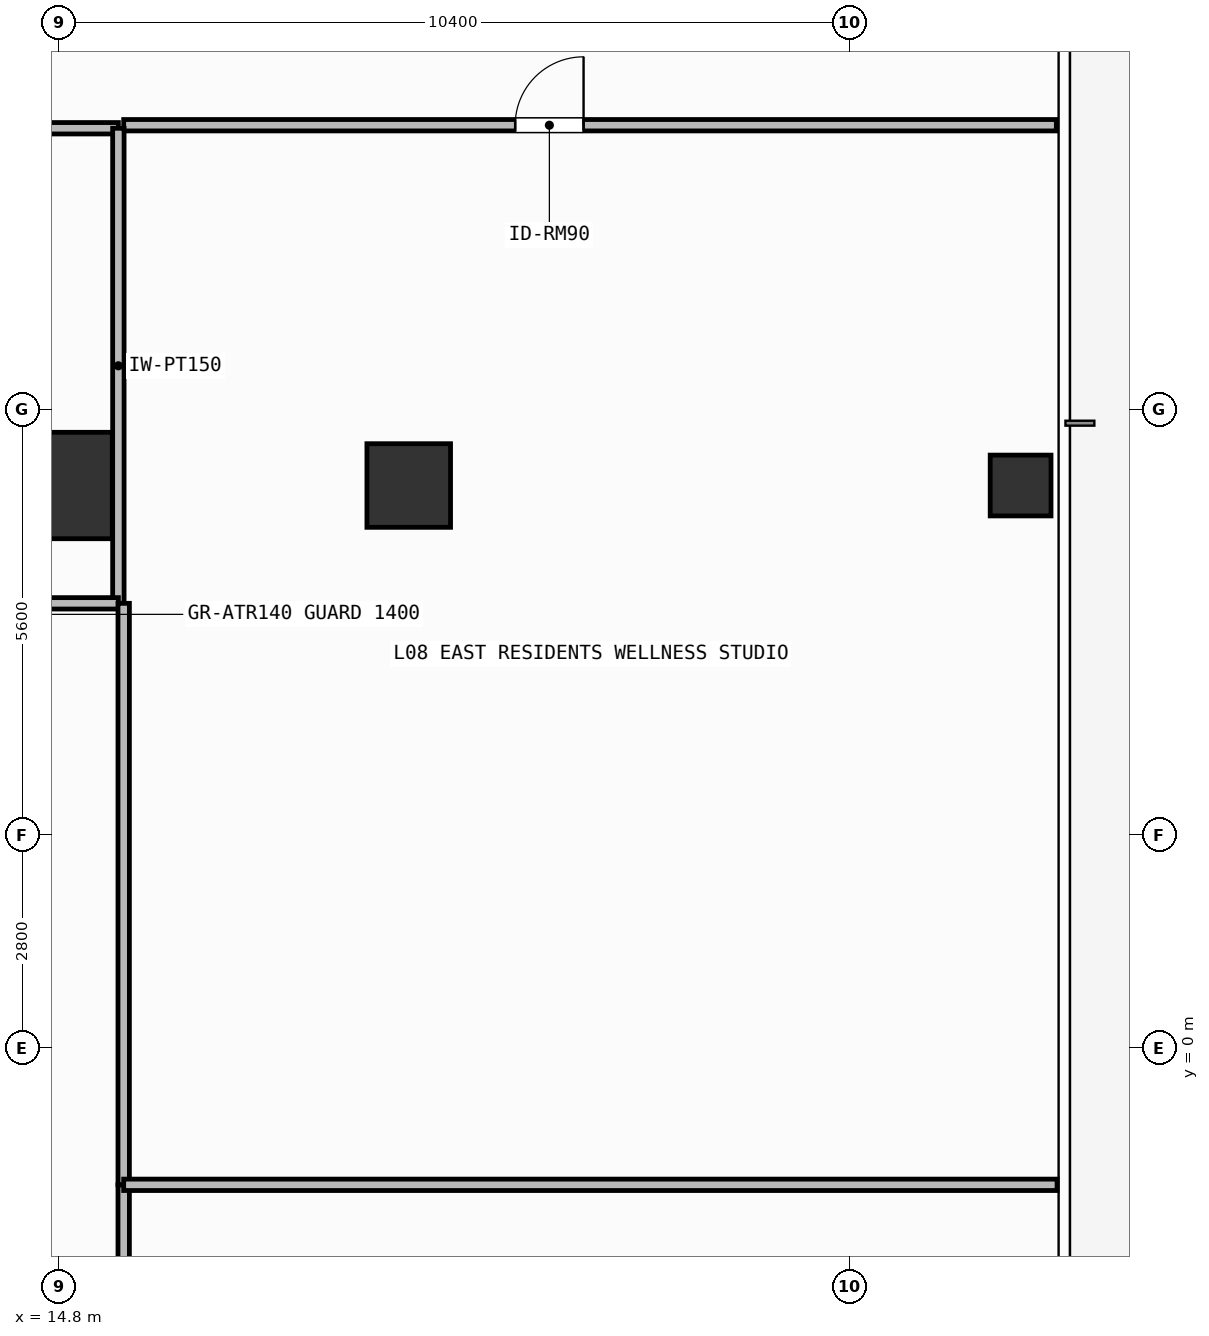
"""IFC4 building model, lengths in metres.
Left out: names, types, materials, properties, quantities, classifications, styles, units other than length and angle.
Written with IfcOpenShell. Run it as: python <this file> out.ifc"""

import sys

from ifc_helpers import new_model, si_unit, direction, frame, frame_2d, origin, origin_2d, place, context, subcontext, project, spatial, rectangle, hollow_rectangle, extrude, element, fill, save


model = new_model("IFC4")
c1 = context("Model", 3, precision=1e-05, world=origin(), true_north=direction((0.0, 1.0)))
c2 = subcontext(c1, "Body", "Model", "MODEL_VIEW")
j1 = project(units=[si_unit("LENGTHUNIT", "METRE"), si_unit("PLANEANGLEUNIT", "RADIAN")], contexts=[c1])
p1 = place(None, origin())
s1 = spatial("IfcSite", under=j1, at=p1, CompositionType="ELEMENT")
p2 = place(p1, origin())
s2 = spatial("IfcBuilding", under=s1, at=p2, CompositionType="ELEMENT")
p3 = place(p2, frame((0.0, 0.0, 30.6)))
s3 = spatial("IfcBuildingStorey", under=s2, at=p3, CompositionType="ELEMENT", Elevation=30.6)
p4 = place(p3, frame((14.8, 7.4, 0.0), z_axis=(0.0, 0.0, 1.0), x_axis=(1.0, 0.0, 0.0)))
e1 = element("IfcColumn", 1, at=p4, inside=s3, PredefinedType="COLUMN", context=c2, shape_type="SweptSolid", body=[
    extrude(rectangle(XDim=1.4, YDim=1.4, at=origin_2d()), origin(), (0.0, 0.0, 1.0), 3.9),
])
p5 = place(p3, frame((19.4, 7.4, 0.0), z_axis=(0.0, 0.0, 1.0), x_axis=(1.0, 0.0, 0.0)))
e2 = element("IfcColumn", 2, at=p5, inside=s3, PredefinedType="COLUMN", context=c2, shape_type="SweptSolid", body=[
    extrude(rectangle(XDim=1.1, YDim=1.1, at=origin_2d()), origin(), (0.0, 0.0, 1.0), 3.9),
])
p6 = place(p3, frame((27.45, 7.4, 0.0), z_axis=(0.0, 0.0, 1.0), x_axis=(1.0, 0.0, 0.0)))
e3 = element("IfcColumn", 3, at=p6, inside=s3, PredefinedType="COLUMN", context=c2, shape_type="SweptSolid", body=[
    extrude(hollow_rectangle(XDim=0.8, YDim=0.8, WallThickness=0.036, at=origin_2d()), origin(), (0.0, 0.0, 1.0), 3.9),
])
p7 = place(p3, frame((8.36, 12.1, 0.0), z_axis=(0.0, 0.0, 1.0), x_axis=(1.0, 0.0, 0.0)))
e4 = element("IfcWall", 4, at=p7, inside=s3, PredefinedType="PARTITIONING", context=c2, shape_type="SweptSolid", body=[
    extrude(rectangle(XDim=7.22, YDim=0.15, at=frame_2d((3.61, 0.0))), origin(), (0.0, 0.0, 1.0), 3.68),
])
p8 = place(p7, frame((3.513, 0.0, 0.0)))
e5 = element("IfcOpeningElement", 5, at=p8, cuts=e4, PredefinedType="OPENING", context=c2, shape_type="SweptSolid", body=[
    extrude(rectangle(XDim=0.9, YDim=2.1, at=frame_2d((0.45, 1.05))), frame((0.0, 0.085, 0.0), z_axis=(0.0, -1.0, 0.0), x_axis=(1.0, 0.0, 0.0)), (0.0, 0.0, 1.0), 0.17),
])
p9 = place(p3, frame((15.65, 12.14, 0.0), z_axis=(0.0, 0.0, 1.0), x_axis=(1.0, 0.0, 0.0)))
e6 = element("IfcWall", 6, at=p9, inside=s3, PredefinedType="PARTITIONING", context=c2, shape_type="SweptSolid", body=[
    extrude(rectangle(XDim=12.27, YDim=0.15, at=frame_2d((6.135, 0.0))), origin(), (0.0, 0.0, 1.0), 3.68),
])
p10 = place(p9, frame((5.15, 0.0, 0.0)))
e7 = element("IfcOpeningElement", 7, at=p10, cuts=e6, PredefinedType="OPENING", context=c2, shape_type="SweptSolid", body=[
    extrude(rectangle(XDim=0.9, YDim=2.1, at=frame_2d((0.45, 1.05))), frame((0.0, 0.085, 0.0), z_axis=(0.0, -1.0, 0.0), x_axis=(1.0, 0.0, 0.0)), (0.0, 0.0, 1.0), 0.17),
])
p11 = place(p3, frame((15.58, 5.85, 0.0), z_axis=(0.0, 0.0, 1.0), x_axis=(0.0, 1.0, 0.0)))
e8 = element("IfcWall", 8, at=p11, inside=s3, PredefinedType="PARTITIONING", context=c2, shape_type="SweptSolid", body=[
    extrude(rectangle(XDim=6.25, YDim=0.15, at=frame_2d((3.125, 0.0))), origin(), (0.0, 0.0, 1.0), 3.68),
])
p12 = place(p3, frame((8.96, 5.85, 0.0), z_axis=(0.0, 0.0, 1.0), x_axis=(1.0, 0.0, 0.0)))
e9 = element("IfcWall", 9, at=p12, inside=s3, PredefinedType="PARTITIONING", context=c2, shape_type="SweptSolid", body=[
    extrude(rectangle(XDim=6.62, YDim=0.15, at=frame_2d((3.31, 0.0))), origin(), (0.0, 0.0, 1.0), 3.68),
])
p13 = place(p3, frame((15.65, -5.85, 0.0), z_axis=(0.0, 0.0, 1.0), x_axis=(0.0, 1.0, 0.0)))
e10 = element("IfcWall", 10, at=p13, inside=s3, PredefinedType="PARTITIONING", context=c2, shape_type="SweptSolid", body=[
    extrude(rectangle(XDim=4.05, YDim=0.15, at=frame_2d((2.025, 0.0))), origin(), (0.0, 0.0, 1.0), 3.68),
])
p14 = place(p3, frame((15.65, -1.8, 0.0), z_axis=(0.0, 0.0, 1.0), x_axis=(0.0, 1.0, 0.0)))
e11 = element("IfcWall", 11, at=p14, inside=s3, PredefinedType="PARTITIONING", context=c2, shape_type="SweptSolid", body=[
    extrude(rectangle(XDim=7.65, YDim=0.15, at=frame_2d((3.825, 0.0))), origin(), (0.0, 0.0, 1.0), 3.68),
])
p15 = place(p3, frame((15.65, -1.8, 0.0), z_axis=(0.0, 0.0, 1.0), x_axis=(1.0, 0.0, 0.0)))
e12 = element("IfcWall", 12, at=p15, inside=s3, PredefinedType="PARTITIONING", context=c2, shape_type="SweptSolid", body=[
    extrude(rectangle(XDim=12.28, YDim=0.15, at=frame_2d((6.14, 0.0))), origin(), (0.0, 0.0, 1.0), 3.68),
])
p16 = place(p10, origin())
e13 = element("IfcDoor", 13, at=p16, inside=s3, OperationType="SINGLE_SWING_RIGHT", PredefinedType="DOOR", context=c2, shape_type="SweptSolid", body=[
    extrude(rectangle(XDim=0.9, YDim=2.1, at=frame_2d((0.45, 1.05))), frame((0.0, 0.025, 0.0), z_axis=(0.0, -1.0, 0.0), x_axis=(1.0, 0.0, 0.0)), (0.0, 0.0, 1.0), 0.05),
])
fill(e7, e13)
save(model, sys.argv[1])
